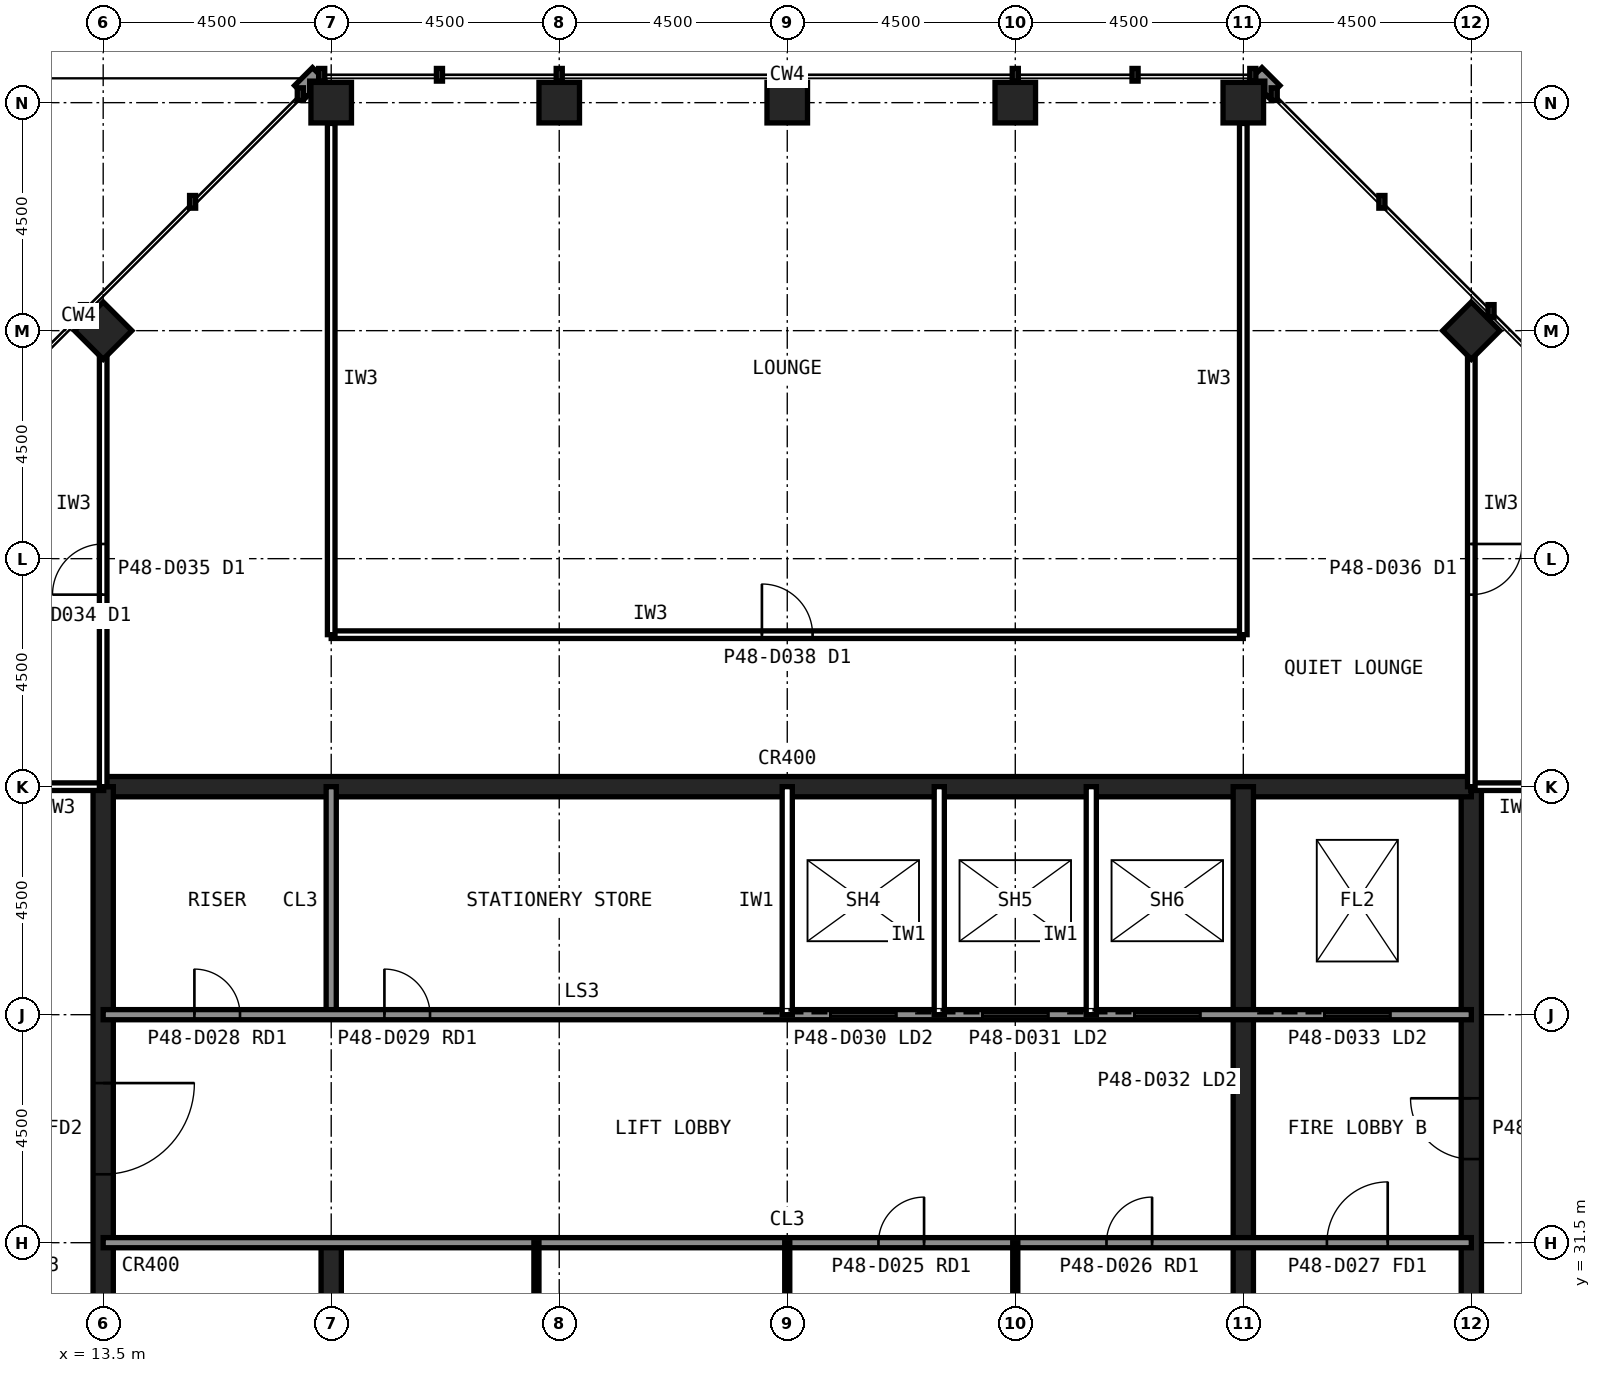
"""IFC4 building model, lengths in metres.
Left out: names, types, materials, properties, quantities, classifications, styles, units other than length and angle.
Written with IfcOpenShell. Run it as: python <this file> out.ifc"""

import sys

from ifc_helpers import new_model, si_unit, direction, frame, frame_2d, origin, origin_2d, place, context, subcontext, project, spatial, rectangle, hollow_rectangle, extrude, element, fill, save


model = new_model("IFC4")
c1 = context("Model", 3, precision=1e-05, world=origin(), true_north=direction((0.0, 1.0)))
c2 = subcontext(c1, "Body", "Model", "MODEL_VIEW")
j1 = project(units=[si_unit("LENGTHUNIT", "METRE"), si_unit("PLANEANGLEUNIT", "RADIAN")], contexts=[c1])
p1 = place(None, origin())
s1 = spatial("IfcSite", under=j1, at=p1, CompositionType="ELEMENT")
p2 = place(p1, origin())
s2 = spatial("IfcBuilding", under=s1, at=p2, CompositionType="ELEMENT")
p3 = place(p2, frame((0.0, 0.0, 205.6)))
s3 = spatial("IfcBuildingStorey", under=s2, at=p3, CompositionType="ELEMENT", Elevation=205.6)
for number, where, z_axis, x_axis in (
    (1, (36.0, 54.0, 0.0), (0.0, 0.0, 1.0), (1.0, 0.0, 0.0)),
    (2, (31.5, 54.0, 0.0), (0.0, 0.0, 1.0), (1.0, 0.0, 0.0)),
    (3, (27.0, 54.0, 0.0), (0.0, 0.0, 1.0), (1.0, 0.0, 0.0)),
    (4, (22.5, 54.0, 0.0), (0.0, 0.0, 1.0), (1.0, 0.0, 0.0)),
    (5, (18.0, 54.0, 0.0), (0.0, 0.0, 1.0), (1.0, 0.0, 0.0)),
    (6, (40.5, 49.5, 0.0), (0.0, 0.0, 1.0), (0.707, 0.707, 0.0)),
    (7, (13.5, 49.5, 0.0), (0.0, 0.0, 1.0), (0.707, 0.707, 0.0)),
):
    element("IfcColumn", number, at=place(p3, frame(where, z_axis=z_axis, x_axis=x_axis)), inside=s3, PredefinedType="COLUMN", context=c2, shape_type="SweptSolid", body=[
        extrude(hollow_rectangle(XDim=0.8, YDim=0.8, WallThickness=0.063, at=origin_2d()), origin(), (0.0, 0.0, 1.0), 5.0),
    ])
p4 = place(p3, frame((40.5, 13.5, 0.0), z_axis=(0.0, 0.0, 1.0), x_axis=(0.0, 1.0, 0.0)))
e8 = element("IfcWall", 8, at=p4, inside=s3, PredefinedType="SHEAR", context=c2, shape_type="SweptSolid", body=[
    extrude(rectangle(XDim=27.0, YDim=0.4, at=frame_2d((13.5, 0.0))), origin(), (0.0, 0.0, 1.0), 5.0),
])
p5 = place(p4, frame((5.85, 0.0, 0.0)))
e9 = element("IfcOpeningElement", 9, at=p5, cuts=e8, PredefinedType="OPENING", context=c2, shape_type="SweptSolid", body=[
    extrude(rectangle(XDim=1.8, YDim=2.1, at=frame_2d((0.9, 1.05))), frame((0.0, 0.21, 0.0), z_axis=(0.0, -1.0, 0.0), x_axis=(1.0, 0.0, 0.0)), (0.0, 0.0, 1.0), 0.42),
])
p6 = place(p4, frame((19.65, 0.0, 0.0)))
e10 = element("IfcOpeningElement", 10, at=p6, cuts=e8, PredefinedType="OPENING", context=c2, shape_type="SweptSolid", body=[
    extrude(rectangle(XDim=1.2, YDim=2.1, at=frame_2d((0.6, 1.05))), frame((0.0, 0.21, 0.0), z_axis=(0.0, -1.0, 0.0), x_axis=(1.0, 0.0, 0.0)), (0.0, 0.0, 1.0), 0.42),
])
p7 = place(p3, frame((40.5, 40.5, 0.0), z_axis=(0.0, 0.0, 1.0), x_axis=(-1.0, 0.0, 0.0)))
e11 = element("IfcWall", 11, at=p7, inside=s3, PredefinedType="SHEAR", context=c2, shape_type="SweptSolid", body=[
    extrude(rectangle(XDim=27.0, YDim=0.4, at=frame_2d((13.5, 0.0))), origin(), (0.0, 0.0, 1.0), 5.0),
])
p8 = place(p3, frame((13.5, 40.5, 0.0), z_axis=(0.0, 0.0, 1.0), x_axis=(0.0, -1.0, 0.0)))
e12 = element("IfcWall", 12, at=p8, inside=s3, PredefinedType="SHEAR", context=c2, shape_type="SweptSolid", body=[
    extrude(rectangle(XDim=27.0, YDim=0.4, at=frame_2d((13.5, 0.0))), origin(), (0.0, 0.0, 1.0), 5.0),
])
p9 = place(p8, frame((19.65, 0.0, 0.0)))
e13 = element("IfcOpeningElement", 13, at=p9, cuts=e12, PredefinedType="OPENING", context=c2, shape_type="SweptSolid", body=[
    extrude(rectangle(XDim=1.2, YDim=2.1, at=frame_2d((0.6, 1.05))), frame((0.0, 0.21, 0.0), z_axis=(0.0, -1.0, 0.0), x_axis=(1.0, 0.0, 0.0)), (0.0, 0.0, 1.0), 0.42),
])
p10 = place(p8, frame((5.85, 0.0, 0.0)))
e14 = element("IfcOpeningElement", 14, at=p10, cuts=e12, PredefinedType="OPENING", context=c2, shape_type="SweptSolid", body=[
    extrude(rectangle(XDim=1.8, YDim=2.1, at=frame_2d((0.9, 1.05))), frame((0.0, 0.21, 0.0), z_axis=(0.0, -1.0, 0.0), x_axis=(1.0, 0.0, 0.0)), (0.0, 0.0, 1.0), 0.42),
])
p11 = place(p3, frame((18.0, 13.5, 0.0), z_axis=(0.0, 0.0, 1.0), x_axis=(0.0, 1.0, 0.0)))
e15 = element("IfcWall", 15, at=p11, inside=s3, PredefinedType="SHEAR", context=c2, shape_type="SweptSolid", body=[
    extrude(rectangle(XDim=18.0, YDim=0.4, at=frame_2d((9.0, 0.0))), origin(), (0.0, 0.0, 1.0), 5.0),
])
p12 = place(p3, frame((18.0, 36.0, 0.0), z_axis=(0.0, 0.0, 1.0), x_axis=(0.0, 1.0, 0.0)))
e16 = element("IfcWall", 16, at=p12, inside=s3, PredefinedType="SOLIDWALL", context=c2, shape_type="SweptSolid", body=[
    extrude(rectangle(XDim=4.5, YDim=0.2, at=frame_2d((2.25, 0.0))), origin(), (0.0, 0.0, 1.0), 4.84),
])
p13 = place(p3, frame((36.0, 22.5, 0.0), z_axis=(0.0, 0.0, 1.0), x_axis=(0.0, 1.0, 0.0)))
e17 = element("IfcWall", 17, at=p13, inside=s3, PredefinedType="SHEAR", context=c2, shape_type="SweptSolid", body=[
    extrude(rectangle(XDim=18.0, YDim=0.4, at=frame_2d((9.0, 0.0))), origin(), (0.0, 0.0, 1.0), 5.0),
])
p14 = place(p3, frame((13.5, 36.0, 0.0), z_axis=(0.0, 0.0, 1.0), x_axis=(1.0, 0.0, 0.0)))
e18 = element("IfcWall", 18, at=p14, inside=s3, PredefinedType="SOLIDWALL", context=c2, shape_type="SweptSolid", body=[
    extrude(rectangle(XDim=27.0, YDim=0.2, at=frame_2d((13.5, 0.0))), origin(), (0.0, 0.0, 1.0), 4.84),
])
p15 = place(p14, frame((1.8, 0.0, 0.0)))
e19 = element("IfcOpeningElement", 19, at=p15, cuts=e18, PredefinedType="OPENING", context=c2, shape_type="SweptSolid", body=[
    extrude(rectangle(XDim=0.9, YDim=2.1, at=frame_2d((0.45, 1.05))), frame((0.0, 0.11, 0.0), z_axis=(0.0, -1.0, 0.0), x_axis=(1.0, 0.0, 0.0)), (0.0, 0.0, 1.0), 0.22),
])
p16 = place(p14, frame((5.55, 0.0, 0.0)))
e20 = element("IfcOpeningElement", 20, at=p16, cuts=e18, PredefinedType="OPENING", context=c2, shape_type="SweptSolid", body=[
    extrude(rectangle(XDim=0.9, YDim=2.1, at=frame_2d((0.45, 1.05))), frame((0.0, 0.11, 0.0), z_axis=(0.0, -1.0, 0.0), x_axis=(1.0, 0.0, 0.0)), (0.0, 0.0, 1.0), 0.22),
])
p17 = place(p14, frame((14.35, 0.0, 0.0)))
e21 = element("IfcOpeningElement", 21, at=p17, cuts=e18, PredefinedType="OPENING", context=c2, shape_type="SweptSolid", body=[
    extrude(rectangle(XDim=1.3, YDim=2.2, at=frame_2d((0.65, 1.1))), frame((0.0, 0.11, 0.0), z_axis=(0.0, -1.0, 0.0), x_axis=(1.0, 0.0, 0.0)), (0.0, 0.0, 1.0), 0.22),
])
p18 = place(p14, frame((17.35, 0.0, 0.0)))
e22 = element("IfcOpeningElement", 22, at=p18, cuts=e18, PredefinedType="OPENING", context=c2, shape_type="SweptSolid", body=[
    extrude(rectangle(XDim=1.3, YDim=2.2, at=frame_2d((0.65, 1.1))), frame((0.0, 0.11, 0.0), z_axis=(0.0, -1.0, 0.0), x_axis=(1.0, 0.0, 0.0)), (0.0, 0.0, 1.0), 0.22),
])
p19 = place(p14, frame((20.35, 0.0, 0.0)))
e23 = element("IfcOpeningElement", 23, at=p19, cuts=e18, PredefinedType="OPENING", context=c2, shape_type="SweptSolid", body=[
    extrude(rectangle(XDim=1.3, YDim=2.2, at=frame_2d((0.65, 1.1))), frame((0.0, 0.11, 0.0), z_axis=(0.0, -1.0, 0.0), x_axis=(1.0, 0.0, 0.0)), (0.0, 0.0, 1.0), 0.22),
])
p20 = place(p14, frame((24.1, 0.0, 0.0)))
e24 = element("IfcOpeningElement", 24, at=p20, cuts=e18, PredefinedType="OPENING", context=c2, shape_type="SweptSolid", body=[
    extrude(rectangle(XDim=1.3, YDim=2.2, at=frame_2d((0.65, 1.1))), frame((0.0, 0.11, 0.0), z_axis=(0.0, -1.0, 0.0), x_axis=(1.0, 0.0, 0.0)), (0.0, 0.0, 1.0), 0.22),
])
p21 = place(p3, frame((13.5, 31.5, 0.0), z_axis=(0.0, 0.0, 1.0), x_axis=(1.0, 0.0, 0.0)))
e25 = element("IfcWall", 25, at=p21, inside=s3, PredefinedType="SOLIDWALL", context=c2, shape_type="SweptSolid", body=[
    extrude(rectangle(XDim=27.0, YDim=0.2, at=frame_2d((13.5, 0.0))), origin(), (0.0, 0.0, 1.0), 4.84),
])
p22 = place(p21, frame((24.15, 0.0, 0.0)))
e26 = element("IfcOpeningElement", 26, at=p22, cuts=e25, PredefinedType="OPENING", context=c2, shape_type="SweptSolid", body=[
    extrude(rectangle(XDim=1.2, YDim=2.1, at=frame_2d((0.6, 1.05))), frame((0.0, 0.11, 0.0), z_axis=(0.0, -1.0, 0.0), x_axis=(1.0, 0.0, 0.0)), (0.0, 0.0, 1.0), 0.22),
])
p23 = place(p21, frame((15.3, 0.0, 0.0)))
e27 = element("IfcOpeningElement", 27, at=p23, cuts=e25, PredefinedType="OPENING", context=c2, shape_type="SweptSolid", body=[
    extrude(rectangle(XDim=0.9, YDim=2.1, at=frame_2d((0.45, 1.05))), frame((0.0, 0.11, 0.0), z_axis=(0.0, -1.0, 0.0), x_axis=(1.0, 0.0, 0.0)), (0.0, 0.0, 1.0), 0.22),
])
p24 = place(p21, frame((19.8, 0.0, 0.0)))
e28 = element("IfcOpeningElement", 28, at=p24, cuts=e25, PredefinedType="OPENING", context=c2, shape_type="SweptSolid", body=[
    extrude(rectangle(XDim=0.9, YDim=2.1, at=frame_2d((0.45, 1.05))), frame((0.0, 0.11, 0.0), z_axis=(0.0, -1.0, 0.0), x_axis=(1.0, 0.0, 0.0)), (0.0, 0.0, 1.0), 0.22),
])
for number, where, z_axis, x_axis in (
    (29, (27.0, 36.0, 0.0), (0.0, 0.0, 1.0), (0.0, 1.0, 0.0)),
    (30, (30.0, 36.0, 0.0), (0.0, 0.0, 1.0), (0.0, 1.0, 0.0)),
    (31, (33.0, 36.0, 0.0), (0.0, 0.0, 1.0), (0.0, 1.0, 0.0)),
):
    element("IfcWall", number, at=place(p3, frame(where, z_axis=z_axis, x_axis=x_axis)), inside=s3, PredefinedType="PARTITIONING", context=c2, shape_type="SweptSolid", body=[
        extrude(rectangle(XDim=4.5, YDim=0.2, at=frame_2d((2.25, 0.0))), origin(), (0.0, 0.0, 1.0), 4.84),
    ])
for number, where, z_axis, x_axis in (
    (32, (22.05, 22.5, 0.0), (0.0, 0.0, 1.0), (0.0, 1.0, 0.0)),
    (33, (27.0, 22.5, 0.0), (0.0, 0.0, 1.0), (0.0, 1.0, 0.0)),
    (34, (31.5, 22.5, 0.0), (0.0, 0.0, 1.0), (0.0, 1.0, 0.0)),
):
    element("IfcWall", number, at=place(p3, frame(where, z_axis=z_axis, x_axis=x_axis)), inside=s3, PredefinedType="PLUMBINGWALL", context=c2, shape_type="SweptSolid", body=[
        extrude(rectangle(XDim=9.0, YDim=0.1, at=frame_2d((4.5, 0.0))), origin(), (0.0, 0.0, 1.0), 4.84),
    ])
for number, where, z_axis, x_axis in (
    (35, (13.51, 40.5, 0.0), (0.0, 0.0, 1.0), (-1.0, 0.0, 0.0)),
    (36, (42.3, 40.5, 0.0), (0.0, 0.0, 1.0), (-1.0, 0.0, 0.0)),
):
    element("IfcWall", number, at=place(p3, frame(where, z_axis=z_axis, x_axis=x_axis)), inside=s3, PredefinedType="PARTITIONING", context=c2, shape_type="SweptSolid", body=[
        extrude(rectangle(XDim=1.81, YDim=0.15, at=frame_2d((0.905, 0.0))), origin(), (0.0, 0.0, 1.0), 3.989),
    ])
p25 = place(p3, frame((18.0, 43.5, 0.0), z_axis=(0.0, 0.0, 1.0), x_axis=(1.0, 0.0, 0.0)))
e37 = element("IfcWall", 37, at=p25, inside=s3, PredefinedType="PARTITIONING", context=c2, shape_type="SweptSolid", body=[
    extrude(rectangle(XDim=18.0, YDim=0.15, at=frame_2d((9.0, 0.0))), origin(), (0.0, 0.0, 1.0), 4.84),
])
p26 = place(p25, frame((8.5, 0.0, 0.0)))
e38 = element("IfcOpeningElement", 38, at=p26, cuts=e37, PredefinedType="OPENING", context=c2, shape_type="SweptSolid", body=[
    extrude(rectangle(XDim=1.0, YDim=2.1, at=frame_2d((0.5, 1.05))), frame((0.0, 0.085, 0.0), z_axis=(0.0, -1.0, 0.0), x_axis=(1.0, 0.0, 0.0)), (0.0, 0.0, 1.0), 0.17),
])
for number, where, z_axis, x_axis in (
    (39, (36.0, 43.5, 0.0), (0.0, 0.0, 1.0), (0.0, 1.0, 0.0)),
    (40, (18.0, 53.59, 0.0), (0.0, 0.0, 1.0), (0.0, -1.0, 0.0)),
):
    element("IfcWall", number, at=place(p3, frame(where, z_axis=z_axis, x_axis=x_axis)), inside=s3, PredefinedType="PARTITIONING", context=c2, shape_type="SweptSolid", body=[
        extrude(rectangle(XDim=10.09, YDim=0.15, at=frame_2d((5.045, 0.0))), origin(), (0.0, 0.0, 1.0), 3.989),
    ])
p27 = place(p3, frame((40.5, 49.08, 0.0), z_axis=(0.0, 0.0, 1.0), x_axis=(0.0, -1.0, 0.0)))
e41 = element("IfcWall", 41, at=p27, inside=s3, PredefinedType="PARTITIONING", context=c2, shape_type="SweptSolid", body=[
    extrude(rectangle(XDim=8.58, YDim=0.15, at=frame_2d((4.29, 0.0))), origin(), (0.0, 0.0, 1.0), 3.989),
])
p28 = place(p27, frame((3.79, 0.0, 0.0)))
e42 = element("IfcOpeningElement", 42, at=p28, cuts=e41, PredefinedType="OPENING", context=c2, shape_type="SweptSolid", body=[
    extrude(rectangle(XDim=1.0, YDim=2.1, at=frame_2d((0.5, 1.05))), frame((0.0, 0.085, 0.0), z_axis=(0.0, -1.0, 0.0), x_axis=(1.0, 0.0, 0.0)), (0.0, 0.0, 1.0), 0.17),
])
p29 = place(p3, frame((13.5, 40.5, 0.0), z_axis=(0.0, 0.0, 1.0), x_axis=(0.0, 1.0, 0.0)))
e43 = element("IfcWall", 43, at=p29, inside=s3, PredefinedType="PARTITIONING", context=c2, shape_type="SweptSolid", body=[
    extrude(rectangle(XDim=8.58, YDim=0.15, at=frame_2d((4.29, 0.0))), origin(), (0.0, 0.0, 1.0), 3.989),
])
p30 = place(p29, frame((3.79, 0.0, 0.0)))
e44 = element("IfcOpeningElement", 44, at=p30, cuts=e43, PredefinedType="OPENING", context=c2, shape_type="SweptSolid", body=[
    extrude(rectangle(XDim=1.0, YDim=2.1, at=frame_2d((0.5, 1.05))), frame((0.0, 0.085, 0.0), z_axis=(0.0, -1.0, 0.0), x_axis=(1.0, 0.0, 0.0)), (0.0, 0.0, 1.0), 0.17),
])
p31 = place(p10, origin())
e45 = element("IfcDoor", 45, at=p31, inside=s3, OperationType="SINGLE_SWING_LEFT", PredefinedType="DOOR", context=c2, shape_type="SweptSolid", body=[
    extrude(rectangle(XDim=1.8, YDim=2.1, at=frame_2d((0.9, 1.05))), frame((0.0, 0.025, 0.0), z_axis=(0.0, -1.0, 0.0), x_axis=(1.0, 0.0, 0.0)), (0.0, 0.0, 1.0), 0.05),
])
fill(e14, e45)
p32 = place(p6, origin())
e46 = element("IfcDoor", 46, at=p32, inside=s3, OperationType="SINGLE_SWING_RIGHT", PredefinedType="DOOR", context=c2, shape_type="SweptSolid", body=[
    extrude(rectangle(XDim=1.2, YDim=2.1, at=frame_2d((0.6, 1.05))), frame((0.0, 0.025, 0.0), z_axis=(0.0, -1.0, 0.0), x_axis=(1.0, 0.0, 0.0)), (0.0, 0.0, 1.0), 0.05),
])
fill(e10, e46)
p33 = place(p22, origin())
e47 = element("IfcDoor", 47, at=p33, inside=s3, OperationType="SINGLE_SWING_RIGHT", PredefinedType="DOOR", context=c2, shape_type="SweptSolid", body=[
    extrude(rectangle(XDim=1.2, YDim=2.1, at=frame_2d((0.6, 1.05))), frame((0.0, 0.025, 0.0), z_axis=(0.0, -1.0, 0.0), x_axis=(1.0, 0.0, 0.0)), (0.0, 0.0, 1.0), 0.05),
])
fill(e26, e47)
p34 = place(p23, origin())
e48 = element("IfcDoor", 48, at=p34, inside=s3, OperationType="SINGLE_SWING_RIGHT", PredefinedType="DOOR", context=c2, shape_type="SweptSolid", body=[
    extrude(rectangle(XDim=0.9, YDim=2.1, at=frame_2d((0.45, 1.05))), frame((0.0, 0.025, 0.0), z_axis=(0.0, -1.0, 0.0), x_axis=(1.0, 0.0, 0.0)), (0.0, 0.0, 1.0), 0.05),
])
fill(e27, e48)
p35 = place(p24, origin())
e49 = element("IfcDoor", 49, at=p35, inside=s3, OperationType="SINGLE_SWING_RIGHT", PredefinedType="DOOR", context=c2, shape_type="SweptSolid", body=[
    extrude(rectangle(XDim=0.9, YDim=2.1, at=frame_2d((0.45, 1.05))), frame((0.0, 0.025, 0.0), z_axis=(0.0, -1.0, 0.0), x_axis=(1.0, 0.0, 0.0)), (0.0, 0.0, 1.0), 0.05),
])
fill(e28, e49)
p36 = place(p15, origin())
e50 = element("IfcDoor", 50, at=p36, inside=s3, OperationType="SINGLE_SWING_LEFT", PredefinedType="DOOR", context=c2, shape_type="SweptSolid", body=[
    extrude(rectangle(XDim=0.9, YDim=2.1, at=frame_2d((0.45, 1.05))), frame((0.0, 0.025, 0.0), z_axis=(0.0, -1.0, 0.0), x_axis=(1.0, 0.0, 0.0)), (0.0, 0.0, 1.0), 0.05),
])
fill(e19, e50)
p37 = place(p16, origin())
e51 = element("IfcDoor", 51, at=p37, inside=s3, OperationType="SINGLE_SWING_LEFT", PredefinedType="DOOR", context=c2, shape_type="SweptSolid", body=[
    extrude(rectangle(XDim=0.9, YDim=2.1, at=frame_2d((0.45, 1.05))), frame((0.0, 0.025, 0.0), z_axis=(0.0, -1.0, 0.0), x_axis=(1.0, 0.0, 0.0)), (0.0, 0.0, 1.0), 0.05),
])
fill(e20, e51)
p38 = place(p17, origin())
e52 = element("IfcDoor", 52, at=p38, inside=s3, OperationType="SLIDING_TO_LEFT", PredefinedType="DOOR", context=c2, shape_type="SweptSolid", body=[
    extrude(rectangle(XDim=1.3, YDim=2.2, at=frame_2d((0.65, 1.1))), frame((0.0, 0.025, 0.0), z_axis=(0.0, -1.0, 0.0), x_axis=(1.0, 0.0, 0.0)), (0.0, 0.0, 1.0), 0.05),
])
fill(e21, e52)
p39 = place(p18, origin())
e53 = element("IfcDoor", 53, at=p39, inside=s3, OperationType="SLIDING_TO_LEFT", PredefinedType="DOOR", context=c2, shape_type="SweptSolid", body=[
    extrude(rectangle(XDim=1.3, YDim=2.2, at=frame_2d((0.65, 1.1))), frame((0.0, 0.025, 0.0), z_axis=(0.0, -1.0, 0.0), x_axis=(1.0, 0.0, 0.0)), (0.0, 0.0, 1.0), 0.05),
])
fill(e22, e53)
p40 = place(p19, origin())
e54 = element("IfcDoor", 54, at=p40, inside=s3, OperationType="SLIDING_TO_LEFT", PredefinedType="DOOR", context=c2, shape_type="SweptSolid", body=[
    extrude(rectangle(XDim=1.3, YDim=2.2, at=frame_2d((0.65, 1.1))), frame((0.0, 0.025, 0.0), z_axis=(0.0, -1.0, 0.0), x_axis=(1.0, 0.0, 0.0)), (0.0, 0.0, 1.0), 0.05),
])
fill(e23, e54)
p41 = place(p20, origin())
e55 = element("IfcDoor", 55, at=p41, inside=s3, OperationType="SLIDING_TO_LEFT", PredefinedType="DOOR", context=c2, shape_type="SweptSolid", body=[
    extrude(rectangle(XDim=1.3, YDim=2.2, at=frame_2d((0.65, 1.1))), frame((0.0, 0.025, 0.0), z_axis=(0.0, -1.0, 0.0), x_axis=(1.0, 0.0, 0.0)), (0.0, 0.0, 1.0), 0.05),
])
fill(e24, e55)
p42 = place(p26, origin())
e56 = element("IfcDoor", 56, at=p42, inside=s3, OperationType="SINGLE_SWING_LEFT", PredefinedType="DOOR", context=c2, shape_type="SweptSolid", body=[
    extrude(rectangle(XDim=1.0, YDim=2.1, at=frame_2d((0.5, 1.05))), frame((0.0, 0.025, 0.0), z_axis=(0.0, -1.0, 0.0), x_axis=(1.0, 0.0, 0.0)), (0.0, 0.0, 1.0), 0.05),
])
fill(e38, e56)
p43 = place(p28, origin())
e57 = element("IfcDoor", 57, at=p43, inside=s3, OperationType="SINGLE_SWING_LEFT", PredefinedType="DOOR", context=c2, shape_type="SweptSolid", body=[
    extrude(rectangle(XDim=1.0, YDim=2.1, at=frame_2d((0.5, 1.05))), frame((0.0, 0.025, 0.0), z_axis=(0.0, -1.0, 0.0), x_axis=(1.0, 0.0, 0.0)), (0.0, 0.0, 1.0), 0.05),
])
fill(e42, e57)
p44 = place(p30, origin())
e58 = element("IfcDoor", 58, at=p44, inside=s3, OperationType="SINGLE_SWING_LEFT", PredefinedType="DOOR", context=c2, shape_type="SweptSolid", body=[
    extrude(rectangle(XDim=1.0, YDim=2.1, at=frame_2d((0.5, 1.05))), frame((0.0, 0.025, 0.0), z_axis=(0.0, -1.0, 0.0), x_axis=(1.0, 0.0, 0.0)), (0.0, 0.0, 1.0), 0.05),
])
fill(e44, e58)
save(model, sys.argv[1])
